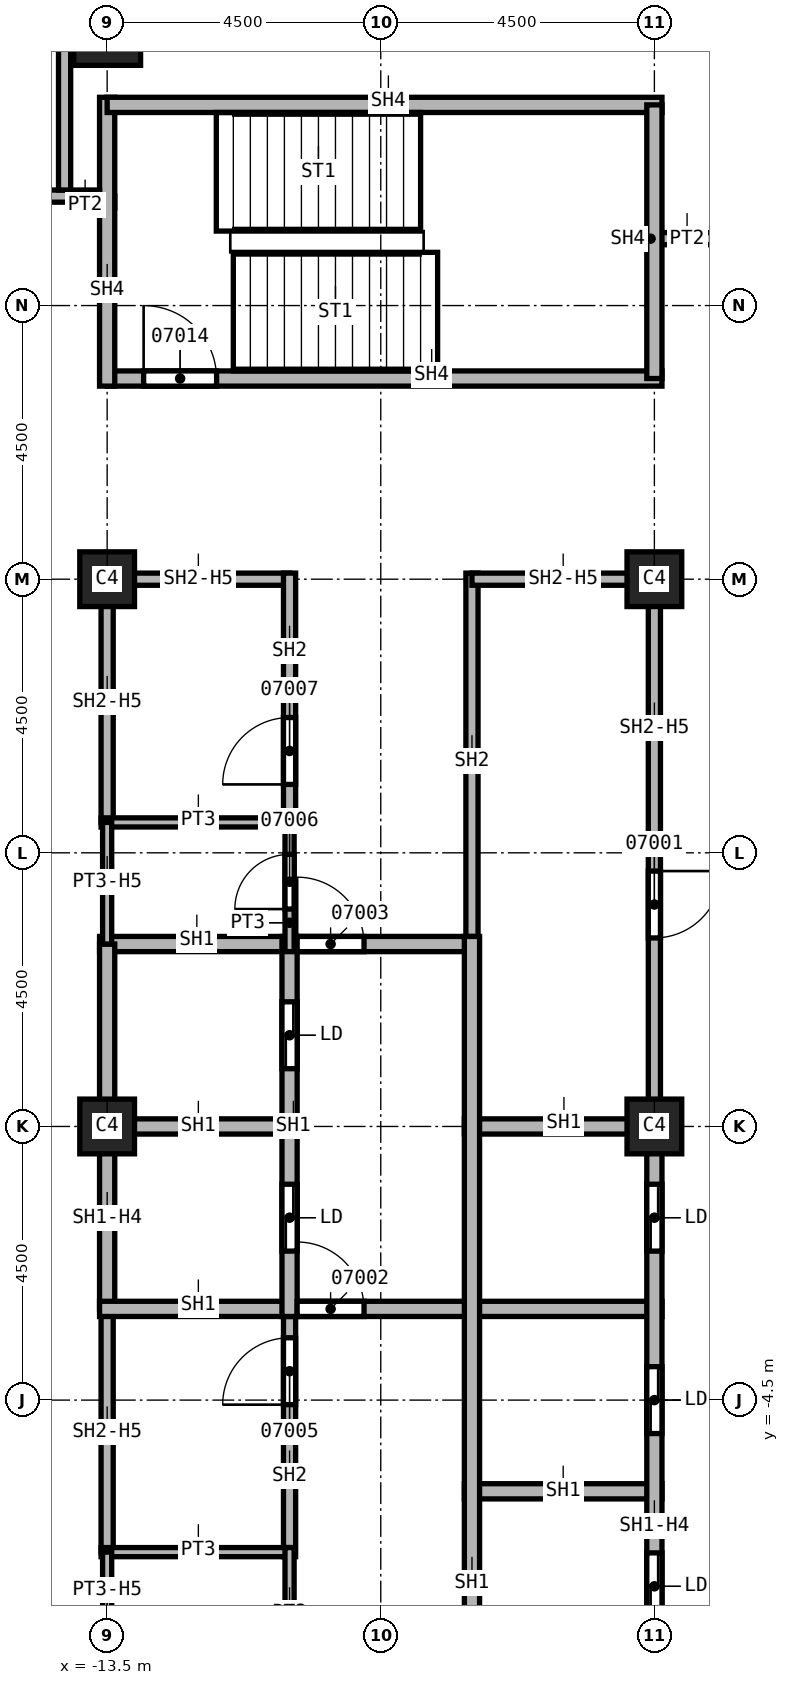
"""IFC4 building model, lengths in metres.
Left out: names, types, materials, properties, quantities, classifications, styles, units other than length and angle.
Written with IfcOpenShell. Run it as: python <this file> out.ifc"""

import sys

from ifc_helpers import new_model, si_unit, direction, frame, frame_2d, origin, origin_2d, place, context, subcontext, project, spatial, rectangle, extrude, element, fill, save


model = new_model("IFC4")
c1 = context("Model", 3, precision=1e-05, world=origin(), true_north=direction((0.0, 1.0)))
c2 = subcontext(c1, "Body", "Model", "MODEL_VIEW")
j1 = project(units=[si_unit("LENGTHUNIT", "METRE"), si_unit("PLANEANGLEUNIT", "RADIAN")], contexts=[c1])
p1 = place(None, origin())
s1 = spatial("IfcSite", under=j1, at=p1, CompositionType="ELEMENT")
p2 = place(p1, origin())
s2 = spatial("IfcBuilding", under=s1, at=p2, CompositionType="ELEMENT")
p3 = place(p2, frame((0.0, 0.0, 138.0)))
s3 = spatial("IfcBuildingStorey", under=s2, at=p3, CompositionType="ELEMENT", Elevation=138.0)
p4 = place(p3, frame((-13.5, 18.0, 0.0), z_axis=(0.0, 0.0, 1.0), x_axis=(1.0, 0.0, 0.0)))
e1 = element("IfcColumn", 1, at=p4, inside=s3, PredefinedType="COLUMN", context=c2, shape_type="SweptSolid", body=[
    extrude(rectangle(XDim=1.1, YDim=1.1, at=origin_2d()), origin(), (0.0, 0.0, 1.0), 3.7),
])
for number, where, z_axis, x_axis in (
    (2, (-4.5, 0.0, 0.0), (0.0, 0.0, 1.0), (1.0, 0.0, 0.0)),
    (3, (-4.5, 9.0, 0.0), (0.0, 0.0, 1.0), (1.0, 0.0, 0.0)),
    (4, (-13.5, 0.0, 0.0), (0.0, 0.0, 1.0), (1.0, 0.0, 0.0)),
    (5, (-13.5, 9.0, 0.0), (0.0, 0.0, 1.0), (1.0, 0.0, 0.0)),
):
    element("IfcColumn", number, at=place(p3, frame(where, z_axis=z_axis, x_axis=x_axis)), inside=s3, PredefinedType="COLUMN", context=c2, shape_type="SweptSolid", body=[
        extrude(rectangle(XDim=0.9, YDim=0.9, at=origin_2d()), origin(), (0.0, 0.0, 1.0), 3.7),
    ])
p5 = place(p3, frame((-14.1, 15.2, 0.0), z_axis=(0.0, 0.0, 1.0), x_axis=(1.0, 0.0, 0.0)))
e6 = element("IfcWall", 6, at=p5, inside=s3, PredefinedType="PARTITIONING", context=c2, shape_type="SweptSolid", body=[
    extrude(rectangle(XDim=0.725, YDim=0.2, at=frame_2d((0.363, 0.0))), origin(), (0.0, 0.0, 1.0), 3.7),
])
p6 = place(p3, frame((-4.5, 14.6, 0.0), z_axis=(0.0, 0.0, 1.0), x_axis=(1.0, 0.0, 0.0)))
e7 = element("IfcWall", 7, at=p6, inside=s3, PredefinedType="PARTITIONING", context=c2, shape_type="SweptSolid", body=[
    extrude(rectangle(XDim=0.95, YDim=0.2, at=frame_2d((0.475, 0.0))), origin(), (0.0, 0.0, 1.0), 3.7),
])
p7 = place(p3, frame((-13.5, -7.0, 0.0), z_axis=(0.0, 0.0, 1.0), x_axis=(0.0, 1.0, 0.0)))
e8 = element("IfcWall", 8, at=p7, inside=s3, PredefinedType="SOLIDWALL", context=c2, shape_type="SweptSolid", body=[
    extrude(rectangle(XDim=4.0, YDim=0.2, at=frame_2d((2.0, 0.0))), origin(), (0.0, 0.0, 1.0), 2.938),
])
p8 = place(p3, frame((-13.5, 5.0, 0.0), z_axis=(0.0, 0.0, 1.0), x_axis=(0.0, 1.0, 0.0)))
e9 = element("IfcWall", 9, at=p8, inside=s3, PredefinedType="SOLIDWALL", context=c2, shape_type="SweptSolid", body=[
    extrude(rectangle(XDim=4.1, YDim=0.2, at=frame_2d((2.05, 0.0))), origin(), (0.0, 0.0, 1.0), 2.938),
])
p9 = place(p3, frame((-13.5, 9.0, 0.0), z_axis=(0.0, 0.0, 1.0), x_axis=(1.0, 0.0, 0.0)))
e10 = element("IfcWall", 10, at=p9, inside=s3, PredefinedType="SOLIDWALL", context=c2, shape_type="SweptSolid", body=[
    extrude(rectangle(XDim=3.0, YDim=0.2, at=frame_2d((1.5, 0.0))), origin(), (0.0, 0.0, 1.0), 2.938),
])
p10 = place(p3, frame((-10.5, -7.075, 0.0), z_axis=(0.0, 0.0, 1.0), x_axis=(0.0, 1.0, 0.0)))
e11 = element("IfcWall", 11, at=p10, inside=s3, PredefinedType="SOLIDWALL", context=c2, shape_type="SweptSolid", body=[
    extrude(rectangle(XDim=4.2, YDim=0.2, at=frame_2d((2.1, 0.0))), origin(), (0.0, 0.0, 1.0), 3.7),
])
p11 = place(p10, frame((2.5, 0.0, 0.0)))
e12 = element("IfcOpeningElement", 12, at=p11, cuts=e11, PredefinedType="OPENING", context=c2, shape_type="SweptSolid", body=[
    extrude(rectangle(XDim=1.1, YDim=2.1, at=frame_2d((0.55, 1.05))), frame((0.0, 0.1, 0.0), z_axis=(0.0, -1.0, 0.0), x_axis=(1.0, 0.0, 0.0)), (0.0, 0.0, 1.0), 0.2),
])
p12 = place(p3, frame((-10.5, 4.925, 0.0), z_axis=(0.0, 0.0, 1.0), x_axis=(0.0, 1.0, 0.0)))
e13 = element("IfcWall", 13, at=p12, inside=s3, PredefinedType="SOLIDWALL", context=c2, shape_type="SweptSolid", body=[
    extrude(rectangle(XDim=4.175, YDim=0.2, at=frame_2d((2.087, 0.0))), origin(), (0.0, 0.0, 1.0), 3.7),
])
p13 = place(p12, frame((0.7, 0.0, 0.0)))
e14 = element("IfcOpeningElement", 14, at=p13, cuts=e13, PredefinedType="OPENING", context=c2, shape_type="SweptSolid", body=[
    extrude(rectangle(XDim=1.1, YDim=2.1, at=frame_2d((0.55, 1.05))), frame((0.0, 0.1, 0.0), z_axis=(0.0, -1.0, 0.0), x_axis=(1.0, 0.0, 0.0)), (0.0, 0.0, 1.0), 0.2),
])
p14 = place(p3, frame((-7.5, 2.875, 0.0), z_axis=(0.0, 0.0, 1.0), x_axis=(0.0, 1.0, 0.0)))
e15 = element("IfcWall", 15, at=p14, inside=s3, PredefinedType="SOLIDWALL", context=c2, shape_type="SweptSolid", body=[
    extrude(rectangle(XDim=6.225, YDim=0.2, at=frame_2d((3.113, 0.0))), origin(), (0.0, 0.0, 1.0), 3.7),
])
p15 = place(p3, frame((-7.5, 9.0, 0.0), z_axis=(0.0, 0.0, 1.0), x_axis=(1.0, 0.0, 0.0)))
e16 = element("IfcWall", 16, at=p15, inside=s3, PredefinedType="SOLIDWALL", context=c2, shape_type="SweptSolid", body=[
    extrude(rectangle(XDim=3.0, YDim=0.2, at=frame_2d((1.5, 0.0))), origin(), (0.0, 0.0, 1.0), 2.938),
])
p16 = place(p3, frame((-4.5, 9.1, 0.0), z_axis=(0.0, 0.0, 1.0), x_axis=(0.0, -1.0, 0.0)))
e17 = element("IfcWall", 17, at=p16, inside=s3, PredefinedType="SOLIDWALL", context=c2, shape_type="SweptSolid", body=[
    extrude(rectangle(XDim=9.1, YDim=0.2, at=frame_2d((4.55, 0.0))), origin(), (0.0, 0.0, 1.0), 2.938),
])
p17 = place(p16, frame((4.9, 0.0, 0.0)))
e18 = element("IfcOpeningElement", 18, at=p17, cuts=e17, PredefinedType="OPENING", context=c2, shape_type="SweptSolid", body=[
    extrude(rectangle(XDim=1.1, YDim=2.1, at=frame_2d((0.55, 1.05))), frame((0.0, 0.1, 0.0), z_axis=(0.0, -1.0, 0.0), x_axis=(1.0, 0.0, 0.0)), (0.0, 0.0, 1.0), 0.2),
])
p18 = place(p3, frame((-13.625, 0.0, 0.0), z_axis=(0.0, 0.0, 1.0), x_axis=(1.0, 0.0, 0.0)))
e19 = element("IfcWall", 19, at=p18, inside=s3, PredefinedType="SOLIDWALL", context=c2, shape_type="SweptSolid", body=[
    extrude(rectangle(XDim=3.125, YDim=0.25, at=frame_2d((1.562, 0.0))), origin(), (0.0, 0.0, 1.0), 3.7),
])
p19 = place(p3, frame((-13.625, 3.0, 0.0), z_axis=(0.0, 0.0, 1.0), x_axis=(1.0, 0.0, 0.0)))
e20 = element("IfcWall", 20, at=p19, inside=s3, PredefinedType="SOLIDWALL", context=c2, shape_type="SweptSolid", body=[
    extrude(rectangle(XDim=6.125, YDim=0.25, at=frame_2d((3.062, 0.0))), origin(), (0.0, 0.0, 1.0), 3.7),
])
p20 = place(p19, frame((3.25, 0.0, 0.0)))
e21 = element("IfcOpeningElement", 21, at=p20, cuts=e20, PredefinedType="OPENING", context=c2, shape_type="SweptSolid", body=[
    extrude(rectangle(XDim=1.1, YDim=2.1, at=frame_2d((0.55, 1.05))), frame((0.0, 0.125, 0.0), z_axis=(0.0, -1.0, 0.0), x_axis=(1.0, 0.0, 0.0)), (0.0, 0.0, 1.0), 0.25),
])
p21 = place(p3, frame((-13.5, -3.0, 0.0), z_axis=(0.0, 0.0, 1.0), x_axis=(0.0, 1.0, 0.0)))
e22 = element("IfcWall", 22, at=p21, inside=s3, PredefinedType="SOLIDWALL", context=c2, shape_type="SweptSolid", body=[
    extrude(rectangle(XDim=6.0, YDim=0.25, at=frame_2d((3.0, 0.0))), origin(), (0.0, 0.0, 1.0), 2.938),
])
p22 = place(p3, frame((-13.625, -3.0, 0.0), z_axis=(0.0, 0.0, 1.0), x_axis=(1.0, 0.0, 0.0)))
e23 = element("IfcWall", 23, at=p22, inside=s3, PredefinedType="SOLIDWALL", context=c2, shape_type="SweptSolid", body=[
    extrude(rectangle(XDim=9.25, YDim=0.25, at=frame_2d((4.625, 0.0))), origin(), (0.0, 0.0, 1.0), 3.7),
])
p23 = place(p22, frame((3.25, 0.0, 0.0)))
e24 = element("IfcOpeningElement", 24, at=p23, cuts=e23, PredefinedType="OPENING", context=c2, shape_type="SweptSolid", body=[
    extrude(rectangle(XDim=1.1, YDim=2.1, at=frame_2d((0.55, 1.05))), frame((0.0, 0.125, 0.0), z_axis=(0.0, -1.0, 0.0), x_axis=(1.0, 0.0, 0.0)), (0.0, 0.0, 1.0), 0.25),
])
p24 = place(p3, frame((-10.5, -3.125, 0.0), z_axis=(0.0, 0.0, 1.0), x_axis=(0.0, 1.0, 0.0)))
e25 = element("IfcWall", 25, at=p24, inside=s3, PredefinedType="SOLIDWALL", context=c2, shape_type="SweptSolid", body=[
    extrude(rectangle(XDim=6.25, YDim=0.25, at=frame_2d((3.125, 0.0))), origin(), (0.0, 0.0, 1.0), 3.7),
])
p25 = place(p24, frame((1.075, 0.0, 0.0)))
e26 = element("IfcOpeningElement", 26, at=p25, cuts=e25, PredefinedType="OPENING", context=c2, shape_type="SweptSolid", body=[
    extrude(rectangle(XDim=1.1, YDim=2.1, at=frame_2d((0.55, 1.05))), frame((0.0, 0.125, 0.0), z_axis=(0.0, -1.0, 0.0), x_axis=(1.0, 0.0, 0.0)), (0.0, 0.0, 1.0), 0.25),
])
p26 = place(p24, frame((4.075, 0.0, 0.0)))
e27 = element("IfcOpeningElement", 27, at=p26, cuts=e25, PredefinedType="OPENING", context=c2, shape_type="SweptSolid", body=[
    extrude(rectangle(XDim=1.1, YDim=2.1, at=frame_2d((0.55, 1.05))), frame((0.0, 0.125, 0.0), z_axis=(0.0, -1.0, 0.0), x_axis=(1.0, 0.0, 0.0)), (0.0, 0.0, 1.0), 0.25),
])
for number, where, z_axis, x_axis in (
    (28, (-7.625, -6.0, 0.0), (0.0, 0.0, 1.0), (1.0, 0.0, 0.0)),
    (29, (-7.625, 0.0, 0.0), (0.0, 0.0, 1.0), (1.0, 0.0, 0.0)),
):
    element("IfcWall", number, at=place(p3, frame(where, z_axis=z_axis, x_axis=x_axis)), inside=s3, PredefinedType="SOLIDWALL", context=c2, shape_type="SweptSolid", body=[
        extrude(rectangle(XDim=3.25, YDim=0.25, at=frame_2d((1.625, 0.0))), origin(), (0.0, 0.0, 1.0), 3.7),
    ])
p27 = place(p3, frame((-7.5, -9.125, 0.0), z_axis=(0.0, 0.0, 1.0), x_axis=(0.0, 1.0, 0.0)))
e30 = element("IfcWall", 30, at=p27, inside=s3, PredefinedType="SOLIDWALL", context=c2, shape_type="SweptSolid", body=[
    extrude(rectangle(XDim=12.25, YDim=0.25, at=frame_2d((6.125, 0.0))), origin(), (0.0, 0.0, 1.0), 3.7),
])
p28 = place(p3, frame((-4.5, 0.0, 0.0), z_axis=(0.0, 0.0, 1.0), x_axis=(0.0, -1.0, 0.0)))
e31 = element("IfcWall", 31, at=p28, inside=s3, PredefinedType="SOLIDWALL", context=c2, shape_type="SweptSolid", body=[
    extrude(rectangle(XDim=9.125, YDim=0.25, at=frame_2d((4.562, 0.0))), origin(), (0.0, 0.0, 1.0), 2.938),
])
p29 = place(p28, frame((7.012, 0.0, 0.0)))
e32 = element("IfcOpeningElement", 32, at=p29, cuts=e31, PredefinedType="OPENING", context=c2, shape_type="SweptSolid", body=[
    extrude(rectangle(XDim=1.1, YDim=2.1, at=frame_2d((0.55, 1.05))), frame((0.0, 0.125, 0.0), z_axis=(0.0, -1.0, 0.0), x_axis=(1.0, 0.0, 0.0)), (0.0, 0.0, 1.0), 0.25),
])
p30 = place(p28, frame((3.95, 0.0, 0.0)))
e33 = element("IfcOpeningElement", 33, at=p30, cuts=e31, PredefinedType="OPENING", context=c2, shape_type="SweptSolid", body=[
    extrude(rectangle(XDim=1.1, YDim=2.1, at=frame_2d((0.55, 1.05))), frame((0.0, 0.125, 0.0), z_axis=(0.0, -1.0, 0.0), x_axis=(1.0, 0.0, 0.0)), (0.0, 0.0, 1.0), 0.25),
])
p31 = place(p28, frame((0.95, 0.0, 0.0)))
e34 = element("IfcOpeningElement", 34, at=p31, cuts=e31, PredefinedType="OPENING", context=c2, shape_type="SweptSolid", body=[
    extrude(rectangle(XDim=1.1, YDim=2.1, at=frame_2d((0.55, 1.05))), frame((0.0, 0.125, 0.0), z_axis=(0.0, -1.0, 0.0), x_axis=(1.0, 0.0, 0.0)), (0.0, 0.0, 1.0), 0.25),
])
p32 = place(p3, frame((-13.5, 12.3, 0.0), z_axis=(0.0, 0.0, 1.0), x_axis=(1.0, 0.0, 0.0)))
e35 = element("IfcWall", 35, at=p32, inside=s3, PredefinedType="SOLIDWALL", context=c2, shape_type="SweptSolid", body=[
    extrude(rectangle(XDim=9.125, YDim=0.25, at=frame_2d((4.562, 0.0))), origin(), (0.0, 0.0, 1.0), 3.7),
])
p33 = place(p32, frame((0.6, 0.0, 0.0)))
e36 = element("IfcOpeningElement", 36, at=p33, cuts=e35, PredefinedType="OPENING", context=c2, shape_type="SweptSolid", body=[
    extrude(rectangle(XDim=1.2, YDim=2.1, at=frame_2d((0.6, 1.05))), frame((0.0, 0.125, 0.0), z_axis=(0.0, -1.0, 0.0), x_axis=(1.0, 0.0, 0.0)), (0.0, 0.0, 1.0), 0.25),
])
p34 = place(p3, frame((-13.5, 12.175, 0.0), z_axis=(0.0, 0.0, 1.0), x_axis=(0.0, 1.0, 0.0)))
e37 = element("IfcWall", 37, at=p34, inside=s3, PredefinedType="SOLIDWALL", context=c2, shape_type="SweptSolid", body=[
    extrude(rectangle(XDim=4.75, YDim=0.25, at=frame_2d((2.375, 0.0))), origin(), (0.0, 0.0, 1.0), 3.7),
])
p35 = place(p3, frame((-13.5, 16.8, 0.0), z_axis=(0.0, 0.0, 1.0), x_axis=(1.0, 0.0, 0.0)))
e38 = element("IfcWall", 38, at=p35, inside=s3, PredefinedType="SOLIDWALL", context=c2, shape_type="SweptSolid", body=[
    extrude(rectangle(XDim=9.125, YDim=0.25, at=frame_2d((4.562, 0.0))), origin(), (0.0, 0.0, 1.0), 3.7),
])
p36 = place(p3, frame((-4.5, 16.8, 0.0), z_axis=(0.0, 0.0, 1.0), x_axis=(0.0, -1.0, 0.0)))
e39 = element("IfcWall", 39, at=p36, inside=s3, PredefinedType="SOLIDWALL", context=c2, shape_type="SweptSolid", body=[
    extrude(rectangle(XDim=4.5, YDim=0.25, at=frame_2d((2.25, 0.0))), origin(), (0.0, 0.0, 1.0), 3.7),
])
for number, where, z_axis, x_axis in (
    (40, (-13.6, -7.0, 0.0), (0.0, 0.0, 1.0), (1.0, 0.0, 0.0)),
    (41, (-13.6, 5.0, 0.0), (0.0, 0.0, 1.0), (1.0, 0.0, 0.0)),
):
    element("IfcWall", number, at=place(p3, frame(where, z_axis=z_axis, x_axis=x_axis)), inside=s3, PredefinedType="PARTITIONING", context=c2, shape_type="SweptSolid", body=[
        extrude(rectangle(XDim=3.1, YDim=0.15, at=frame_2d((1.55, 0.0))), origin(), (0.0, 0.0, 1.0), 3.7),
    ])
p37 = place(p3, frame((-13.5, -9.075, 0.0), z_axis=(0.0, 0.0, 1.0), x_axis=(0.0, 1.0, 0.0)))
e42 = element("IfcWall", 42, at=p37, inside=s3, PredefinedType="PARTITIONING", context=c2, shape_type="SweptSolid", body=[
    extrude(rectangle(XDim=2.075, YDim=0.15, at=frame_2d((1.038, 0.0))), origin(), (0.0, 0.0, 1.0), 2.938),
])
p38 = place(p3, frame((-13.5, 3.0, 0.0), z_axis=(0.0, 0.0, 1.0), x_axis=(0.0, 1.0, 0.0)))
e43 = element("IfcWall", 43, at=p38, inside=s3, PredefinedType="PARTITIONING", context=c2, shape_type="SweptSolid", body=[
    extrude(rectangle(XDim=2.0, YDim=0.15, at=frame_2d((1.0, 0.0))), origin(), (0.0, 0.0, 1.0), 2.938),
])
p39 = place(p3, frame((-10.5, -9.075, 0.0), z_axis=(0.0, 0.0, 1.0), x_axis=(0.0, 1.0, 0.0)))
e44 = element("IfcWall", 44, at=p39, inside=s3, PredefinedType="PARTITIONING", context=c2, shape_type="SweptSolid", body=[
    extrude(rectangle(XDim=2.15, YDim=0.15, at=frame_2d((1.075, 0.0))), origin(), (0.0, 0.0, 1.0), 3.7),
])
p40 = place(p3, frame((-10.5, 2.875, 0.0), z_axis=(0.0, 0.0, 1.0), x_axis=(0.0, 1.0, 0.0)))
e45 = element("IfcWall", 45, at=p40, inside=s3, PredefinedType="PARTITIONING", context=c2, shape_type="SweptSolid", body=[
    extrude(rectangle(XDim=2.2, YDim=0.15, at=frame_2d((1.1, 0.0))), origin(), (0.0, 0.0, 1.0), 3.7),
])
p41 = place(p40, frame((0.7, 0.0, 0.0)))
e46 = element("IfcOpeningElement", 46, at=p41, cuts=e45, PredefinedType="OPENING", context=c2, shape_type="SweptSolid", body=[
    extrude(rectangle(XDim=0.9, YDim=2.1, at=frame_2d((0.45, 1.05))), frame((0.0, 0.075, 0.0), z_axis=(0.0, -1.0, 0.0), x_axis=(1.0, 0.0, 0.0)), (0.0, 0.0, 1.0), 0.15),
])
p42 = place(p3, frame((-21.9, 15.3, 0.0), z_axis=(0.0, 0.0, 1.0), x_axis=(1.0, 0.0, 0.0)))
e47 = element("IfcWall", 47, at=p42, inside=s3, PredefinedType="SOLIDWALL", context=c2, shape_type="SweptSolid", body=[
    extrude(rectangle(XDim=8.275, YDim=0.2, at=frame_2d((4.137, 0.0))), origin(), (0.0, 0.0, 1.0), 3.7),
])
p43 = place(p42, frame((4.8, 0.0, 0.0)))
e48 = element("IfcOpeningElement", 48, at=p43, cuts=e47, PredefinedType="OPENING", context=c2, shape_type="SweptSolid", body=[
    extrude(rectangle(XDim=1.2, YDim=2.1, at=frame_2d((0.6, 1.05))), frame((0.0, 0.1, 0.0), z_axis=(0.0, -1.0, 0.0), x_axis=(1.0, 0.0, 0.0)), (0.0, 0.0, 1.0), 0.2),
])
p44 = place(p3, frame((-14.2, 15.4, 0.0), z_axis=(0.0, 0.0, 1.0), x_axis=(0.0, 1.0, 0.0)))
e49 = element("IfcWall", 49, at=p44, inside=s3, PredefinedType="SOLIDWALL", context=c2, shape_type="SweptSolid", body=[
    extrude(rectangle(XDim=5.9, YDim=0.2, at=frame_2d((2.95, 0.0))), origin(), (0.0, 0.0, 1.0), 3.7),
])
p45 = place(p17, origin())
e50 = element("IfcDoor", 50, at=p45, inside=s3, OperationType="SINGLE_SWING_RIGHT", PredefinedType="DOOR", context=c2, shape_type="SweptSolid", body=[
    extrude(rectangle(XDim=1.1, YDim=2.1, at=frame_2d((0.55, 1.05))), frame((0.0, 0.025, 0.0), z_axis=(0.0, -1.0, 0.0), x_axis=(1.0, 0.0, 0.0)), (0.0, 0.0, 1.0), 0.05),
])
fill(e18, e50)
p46 = place(p23, origin())
e51 = element("IfcDoor", 51, at=p46, inside=s3, OperationType="SINGLE_SWING_LEFT", PredefinedType="DOOR", context=c2, shape_type="SweptSolid", body=[
    extrude(rectangle(XDim=1.1, YDim=2.1, at=frame_2d((0.55, 1.05))), frame((0.0, 0.025, 0.0), z_axis=(0.0, -1.0, 0.0), x_axis=(1.0, 0.0, 0.0)), (0.0, 0.0, 1.0), 0.05),
])
fill(e24, e51)
p47 = place(p20, origin())
e52 = element("IfcDoor", 52, at=p47, inside=s3, OperationType="SINGLE_SWING_RIGHT", PredefinedType="DOOR", context=c2, shape_type="SweptSolid", body=[
    extrude(rectangle(XDim=1.1, YDim=2.1, at=frame_2d((0.55, 1.05))), frame((0.0, 0.025, 0.0), z_axis=(0.0, -1.0, 0.0), x_axis=(1.0, 0.0, 0.0)), (0.0, 0.0, 1.0), 0.05),
])
fill(e21, e52)
p48 = place(p11, origin())
e53 = element("IfcDoor", 53, at=p48, inside=s3, OperationType="SINGLE_SWING_RIGHT", PredefinedType="DOOR", context=c2, shape_type="SweptSolid", body=[
    extrude(rectangle(XDim=1.1, YDim=2.1, at=frame_2d((0.55, 1.05))), frame((0.0, 0.025, 0.0), z_axis=(0.0, -1.0, 0.0), x_axis=(1.0, 0.0, 0.0)), (0.0, 0.0, 1.0), 0.05),
])
fill(e12, e53)
p49 = place(p41, origin())
e54 = element("IfcDoor", 54, at=p49, inside=s3, OperationType="SINGLE_SWING_LEFT", PredefinedType="DOOR", context=c2, shape_type="SweptSolid", body=[
    extrude(rectangle(XDim=0.9, YDim=2.1, at=frame_2d((0.45, 1.05))), frame((0.0, 0.025, 0.0), z_axis=(0.0, -1.0, 0.0), x_axis=(1.0, 0.0, 0.0)), (0.0, 0.0, 1.0), 0.05),
])
fill(e46, e54)
p50 = place(p13, origin())
e55 = element("IfcDoor", 55, at=p50, inside=s3, OperationType="SINGLE_SWING_RIGHT", PredefinedType="DOOR", context=c2, shape_type="SweptSolid", body=[
    extrude(rectangle(XDim=1.1, YDim=2.1, at=frame_2d((0.55, 1.05))), frame((0.0, 0.025, 0.0), z_axis=(0.0, -1.0, 0.0), x_axis=(1.0, 0.0, 0.0)), (0.0, 0.0, 1.0), 0.05),
])
fill(e14, e55)
p51 = place(p33, origin())
e56 = element("IfcDoor", 56, at=p51, inside=s3, OperationType="SINGLE_SWING_LEFT", PredefinedType="DOOR", context=c2, shape_type="SweptSolid", body=[
    extrude(rectangle(XDim=1.2, YDim=2.1, at=frame_2d((0.6, 1.05))), frame((0.0, 0.025, 0.0), z_axis=(0.0, -1.0, 0.0), x_axis=(1.0, 0.0, 0.0)), (0.0, 0.0, 1.0), 0.05),
])
fill(e36, e56)
p52 = place(p29, origin())
e57 = element("IfcDoor", 57, at=p52, inside=s3, OperationType="SLIDING_TO_LEFT", PredefinedType="DOOR", context=c2, shape_type="SweptSolid", body=[
    extrude(rectangle(XDim=1.1, YDim=2.1, at=frame_2d((0.55, 1.05))), frame((0.0, 0.025, 0.0), z_axis=(0.0, -1.0, 0.0), x_axis=(1.0, 0.0, 0.0)), (0.0, 0.0, 1.0), 0.05),
])
fill(e32, e57)
p53 = place(p30, origin())
e58 = element("IfcDoor", 58, at=p53, inside=s3, OperationType="SLIDING_TO_LEFT", PredefinedType="DOOR", context=c2, shape_type="SweptSolid", body=[
    extrude(rectangle(XDim=1.1, YDim=2.1, at=frame_2d((0.55, 1.05))), frame((0.0, 0.025, 0.0), z_axis=(0.0, -1.0, 0.0), x_axis=(1.0, 0.0, 0.0)), (0.0, 0.0, 1.0), 0.05),
])
fill(e33, e58)
p54 = place(p31, origin())
e59 = element("IfcDoor", 59, at=p54, inside=s3, OperationType="SLIDING_TO_LEFT", PredefinedType="DOOR", context=c2, shape_type="SweptSolid", body=[
    extrude(rectangle(XDim=1.1, YDim=2.1, at=frame_2d((0.55, 1.05))), frame((0.0, 0.025, 0.0), z_axis=(0.0, -1.0, 0.0), x_axis=(1.0, 0.0, 0.0)), (0.0, 0.0, 1.0), 0.05),
])
fill(e34, e59)
p55 = place(p25, origin())
e60 = element("IfcDoor", 60, at=p55, inside=s3, OperationType="SLIDING_TO_LEFT", PredefinedType="DOOR", context=c2, shape_type="SweptSolid", body=[
    extrude(rectangle(XDim=1.1, YDim=2.1, at=frame_2d((0.55, 1.05))), frame((0.0, 0.025, 0.0), z_axis=(0.0, -1.0, 0.0), x_axis=(1.0, 0.0, 0.0)), (0.0, 0.0, 1.0), 0.05),
])
fill(e26, e60)
p56 = place(p26, origin())
e61 = element("IfcDoor", 61, at=p56, inside=s3, OperationType="SLIDING_TO_LEFT", PredefinedType="DOOR", context=c2, shape_type="SweptSolid", body=[
    extrude(rectangle(XDim=1.1, YDim=2.1, at=frame_2d((0.55, 1.05))), frame((0.0, 0.025, 0.0), z_axis=(0.0, -1.0, 0.0), x_axis=(1.0, 0.0, 0.0)), (0.0, 0.0, 1.0), 0.05),
])
fill(e27, e61)
save(model, sys.argv[1])
